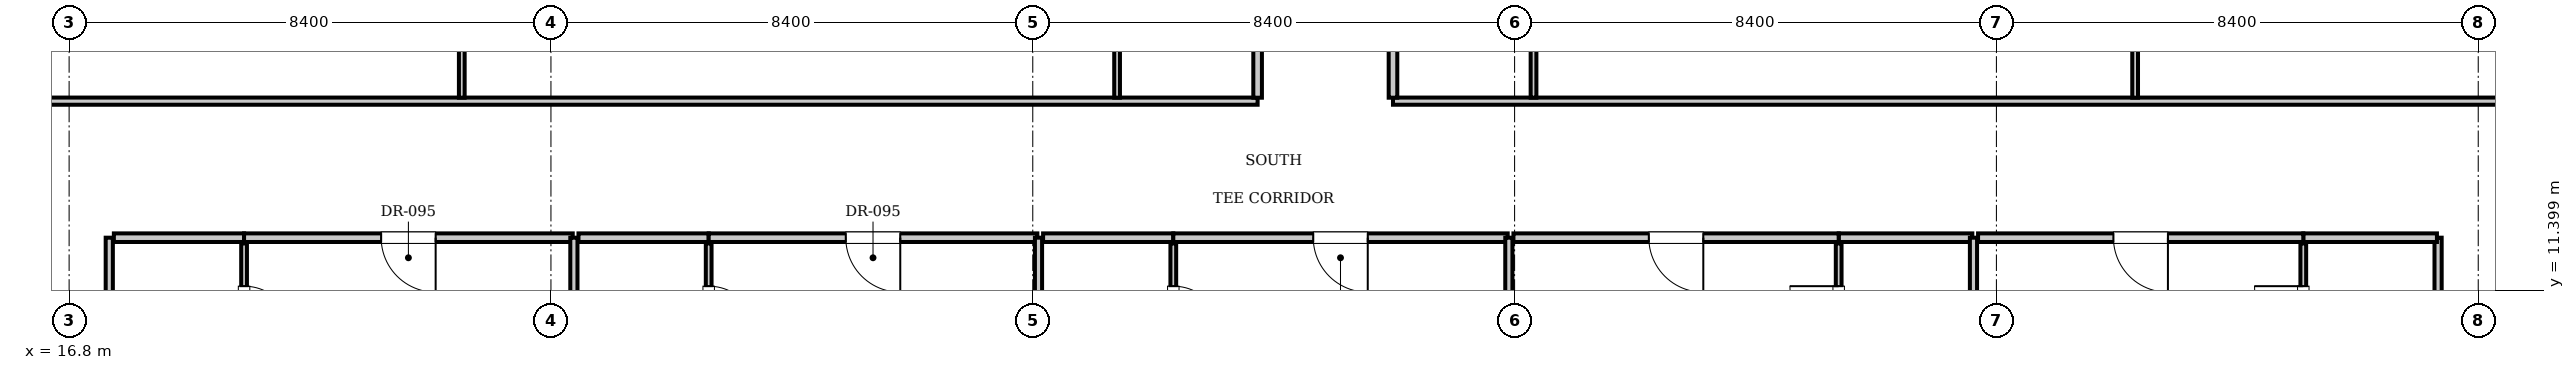
"""IFC4 building model, lengths in metres.
Left out: names, types, materials, properties, quantities, classifications, styles, units other than length and angle.
Written with IfcOpenShell. Run it as: python <this file> out.ifc"""

import sys

from ifc_helpers import new_model, si_unit, direction, frame, frame_2d, origin, place, context, subcontext, project, spatial, rectangle, extrude, element, fill, save


model = new_model("IFC4")
c1 = context("Model", 3, precision=1e-05, world=origin(), true_north=direction((0.0, 1.0)))
c2 = subcontext(c1, "Body", "Model", "MODEL_VIEW")
j1 = project(units=[si_unit("LENGTHUNIT", "METRE"), si_unit("PLANEANGLEUNIT", "RADIAN")], contexts=[c1])
p1 = place(None, origin())
s1 = spatial("IfcSite", under=j1, at=p1, CompositionType="ELEMENT")
p2 = place(p1, origin())
s2 = spatial("IfcBuilding", under=s1, at=p2, CompositionType="ELEMENT")
p3 = place(p2, frame((0.0, 0.0, 173.6)))
s3 = spatial("IfcBuildingStorey", under=s2, at=p3, CompositionType="ELEMENT", Elevation=173.6)
for number, where, z_axis, x_axis in (
    (1, (17.5, 9.0, 0.0), (0.0, 0.0, 1.0), (0.0, 1.0, 0.0)),
    (2, (58.1, 9.0, 0.0), (0.0, 0.0, 1.0), (0.0, 1.0, 0.0)),
):
    element("IfcWall", number, at=place(p3, frame(where, z_axis=z_axis, x_axis=x_axis)), inside=s3, PredefinedType="PARTITIONING", context=c2, shape_type="SweptSolid", body=[
        extrude(rectangle(XDim=3.32, YDim=0.125, at=frame_2d((1.66, 0.0))), origin(), (0.0, 0.0, 1.0), 3.61),
    ])
p4 = place(p3, frame((17.58, 12.32, 0.0), z_axis=(0.0, 0.0, 1.0), x_axis=(1.0, 0.0, 0.0)))
e3 = element("IfcWall", 3, at=p4, inside=s3, PredefinedType="PARTITIONING", context=c2, shape_type="SweptSolid", body=[
    extrude(rectangle(XDim=2.27, YDim=0.15, at=frame_2d((1.135, 0.0))), origin(), (0.0, 0.0, 1.0), 3.61),
])
p5 = place(p3, frame((19.85, 9.88, 0.0), z_axis=(0.0, 0.0, 1.0), x_axis=(0.0, 1.0, 0.0)))
e4 = element("IfcWall", 4, at=p5, inside=s3, PredefinedType="PARTITIONING", context=c2, shape_type="SweptSolid", body=[
    extrude(rectangle(XDim=2.34, YDim=0.1, at=frame_2d((1.17, 0.0))), origin(), (0.0, 0.0, 1.0), 3.61),
])
p6 = place(p5, frame((0.745, 0.0, 0.0)))
e5 = element("IfcOpeningElement", 5, at=p6, cuts=e4, PredefinedType="OPENING", context=c2, shape_type="SweptSolid", body=[
    extrude(rectangle(XDim=0.85, YDim=2.1, at=frame_2d((0.425, 1.05))), frame((0.0, 0.06, 0.0), z_axis=(0.0, -1.0, 0.0), x_axis=(1.0, 0.0, 0.0)), (0.0, 0.0, 1.0), 0.12),
])
p7 = place(p3, frame((19.85, 12.32, 0.0), z_axis=(0.0, 0.0, 1.0), x_axis=(1.0, 0.0, 0.0)))
e6 = element("IfcWall", 6, at=p7, inside=s3, PredefinedType="PARTITIONING", context=c2, shape_type="SweptSolid", body=[
    extrude(rectangle(XDim=5.73, YDim=0.15, at=frame_2d((2.865, 0.0))), origin(), (0.0, 0.0, 1.0), 3.61),
])
p8 = place(p7, frame((2.39, 0.0, 0.0)))
e7 = element("IfcOpeningElement", 7, at=p8, cuts=e6, PredefinedType="OPENING", context=c2, shape_type="SweptSolid", body=[
    extrude(rectangle(XDim=0.95, YDim=2.15, at=frame_2d((0.475, 1.075))), frame((0.0, 0.085, 0.0), z_axis=(0.0, -1.0, 0.0), x_axis=(1.0, 0.0, 0.0)), (0.0, 0.0, 1.0), 0.17),
])
p9 = place(p3, frame((25.6, 4.7, 0.0), z_axis=(0.0, 0.0, 1.0), x_axis=(0.0, 1.0, 0.0)))
e8 = element("IfcWall", 8, at=p9, inside=s3, PredefinedType="PARTITIONING", context=c2, shape_type="SweptSolid", body=[
    extrude(rectangle(XDim=7.62, YDim=0.125, at=frame_2d((3.81, 0.0))), origin(), (0.0, 0.0, 1.0), 3.61),
])
p10 = place(p3, frame((25.68, 12.32, 0.0), z_axis=(0.0, 0.0, 1.0), x_axis=(1.0, 0.0, 0.0)))
e9 = element("IfcWall", 9, at=p10, inside=s3, PredefinedType="PARTITIONING", context=c2, shape_type="SweptSolid", body=[
    extrude(rectangle(XDim=2.27, YDim=0.15, at=frame_2d((1.135, 0.0))), origin(), (0.0, 0.0, 1.0), 3.61),
])
p11 = place(p3, frame((27.95, 9.88, 0.0), z_axis=(0.0, 0.0, 1.0), x_axis=(0.0, 1.0, 0.0)))
e10 = element("IfcWall", 10, at=p11, inside=s3, PredefinedType="PARTITIONING", context=c2, shape_type="SweptSolid", body=[
    extrude(rectangle(XDim=2.34, YDim=0.1, at=frame_2d((1.17, 0.0))), origin(), (0.0, 0.0, 1.0), 3.61),
])
p12 = place(p11, frame((0.745, 0.0, 0.0)))
e11 = element("IfcOpeningElement", 11, at=p12, cuts=e10, PredefinedType="OPENING", context=c2, shape_type="SweptSolid", body=[
    extrude(rectangle(XDim=0.85, YDim=2.1, at=frame_2d((0.425, 1.05))), frame((0.0, 0.06, 0.0), z_axis=(0.0, -1.0, 0.0), x_axis=(1.0, 0.0, 0.0)), (0.0, 0.0, 1.0), 0.12),
])
p13 = place(p3, frame((27.95, 12.32, 0.0), z_axis=(0.0, 0.0, 1.0), x_axis=(1.0, 0.0, 0.0)))
e12 = element("IfcWall", 12, at=p13, inside=s3, PredefinedType="PARTITIONING", context=c2, shape_type="SweptSolid", body=[
    extrude(rectangle(XDim=5.73, YDim=0.15, at=frame_2d((2.865, 0.0))), origin(), (0.0, 0.0, 1.0), 3.61),
])
p14 = place(p13, frame((2.39, 0.0, 0.0)))
e13 = element("IfcOpeningElement", 13, at=p14, cuts=e12, PredefinedType="OPENING", context=c2, shape_type="SweptSolid", body=[
    extrude(rectangle(XDim=0.95, YDim=2.15, at=frame_2d((0.475, 1.075))), frame((0.0, 0.085, 0.0), z_axis=(0.0, -1.0, 0.0), x_axis=(1.0, 0.0, 0.0)), (0.0, 0.0, 1.0), 0.17),
])
p15 = place(p3, frame((33.7, 4.7, 0.0), z_axis=(0.0, 0.0, 1.0), x_axis=(0.0, 1.0, 0.0)))
e14 = element("IfcWall", 14, at=p15, inside=s3, PredefinedType="PARTITIONING", context=c2, shape_type="SweptSolid", body=[
    extrude(rectangle(XDim=7.62, YDim=0.125, at=frame_2d((3.81, 0.0))), origin(), (0.0, 0.0, 1.0), 3.007),
])
p16 = place(p3, frame((33.78, 12.32, 0.0), z_axis=(0.0, 0.0, 1.0), x_axis=(1.0, 0.0, 0.0)))
e15 = element("IfcWall", 15, at=p16, inside=s3, PredefinedType="PARTITIONING", context=c2, shape_type="SweptSolid", body=[
    extrude(rectangle(XDim=2.27, YDim=0.15, at=frame_2d((1.135, 0.0))), origin(), (0.0, 0.0, 1.0), 3.61),
])
p17 = place(p3, frame((36.05, 9.88, 0.0), z_axis=(0.0, 0.0, 1.0), x_axis=(0.0, 1.0, 0.0)))
e16 = element("IfcWall", 16, at=p17, inside=s3, PredefinedType="PARTITIONING", context=c2, shape_type="SweptSolid", body=[
    extrude(rectangle(XDim=2.34, YDim=0.1, at=frame_2d((1.17, 0.0))), origin(), (0.0, 0.0, 1.0), 3.61),
])
p18 = place(p17, frame((0.745, 0.0, 0.0)))
e17 = element("IfcOpeningElement", 17, at=p18, cuts=e16, PredefinedType="OPENING", context=c2, shape_type="SweptSolid", body=[
    extrude(rectangle(XDim=0.85, YDim=2.1, at=frame_2d((0.425, 1.05))), frame((0.0, 0.06, 0.0), z_axis=(0.0, -1.0, 0.0), x_axis=(1.0, 0.0, 0.0)), (0.0, 0.0, 1.0), 0.12),
])
p19 = place(p3, frame((36.05, 12.32, 0.0), z_axis=(0.0, 0.0, 1.0), x_axis=(1.0, 0.0, 0.0)))
e18 = element("IfcWall", 18, at=p19, inside=s3, PredefinedType="PARTITIONING", context=c2, shape_type="SweptSolid", body=[
    extrude(rectangle(XDim=5.83, YDim=0.15, at=frame_2d((2.915, 0.0))), origin(), (0.0, 0.0, 1.0), 3.61),
])
p20 = place(p19, frame((2.44, 0.0, 0.0)))
e19 = element("IfcOpeningElement", 19, at=p20, cuts=e18, PredefinedType="OPENING", context=c2, shape_type="SweptSolid", body=[
    extrude(rectangle(XDim=0.95, YDim=2.15, at=frame_2d((0.475, 1.075))), frame((0.0, 0.085, 0.0), z_axis=(0.0, -1.0, 0.0), x_axis=(1.0, 0.0, 0.0)), (0.0, 0.0, 1.0), 0.17),
])
p21 = place(p3, frame((41.9, 4.7, 0.0), z_axis=(0.0, 0.0, 1.0), x_axis=(0.0, 1.0, 0.0)))
e20 = element("IfcWall", 20, at=p21, inside=s3, PredefinedType="PARTITIONING", context=c2, shape_type="SweptSolid", body=[
    extrude(rectangle(XDim=7.62, YDim=0.125, at=frame_2d((3.81, 0.0))), origin(), (0.0, 0.0, 1.0), 3.007),
])
p22 = place(p3, frame((47.65, 12.32, 0.0), z_axis=(0.0, 0.0, 1.0), x_axis=(1.0, 0.0, 0.0)))
e21 = element("IfcWall", 21, at=p22, inside=s3, PredefinedType="PARTITIONING", context=c2, shape_type="SweptSolid", body=[
    extrude(rectangle(XDim=2.33, YDim=0.15, at=frame_2d((1.165, 0.0))), origin(), (0.0, 0.0, 1.0), 3.61),
])
p23 = place(p3, frame((47.65, 9.88, 0.0), z_axis=(0.0, 0.0, 1.0), x_axis=(0.0, 1.0, 0.0)))
e22 = element("IfcWall", 22, at=p23, inside=s3, PredefinedType="PARTITIONING", context=c2, shape_type="SweptSolid", body=[
    extrude(rectangle(XDim=2.34, YDim=0.1, at=frame_2d((1.17, 0.0))), origin(), (0.0, 0.0, 1.0), 3.61),
])
p24 = place(p23, frame((0.745, 0.0, 0.0)))
e23 = element("IfcOpeningElement", 23, at=p24, cuts=e22, PredefinedType="OPENING", context=c2, shape_type="SweptSolid", body=[
    extrude(rectangle(XDim=0.85, YDim=2.1, at=frame_2d((0.425, 1.05))), frame((0.0, 0.06, 0.0), z_axis=(0.0, -1.0, 0.0), x_axis=(1.0, 0.0, 0.0)), (0.0, 0.0, 1.0), 0.12),
])
p25 = place(p3, frame((41.98, 12.32, 0.0), z_axis=(0.0, 0.0, 1.0), x_axis=(1.0, 0.0, 0.0)))
e24 = element("IfcWall", 24, at=p25, inside=s3, PredefinedType="PARTITIONING", context=c2, shape_type="SweptSolid", body=[
    extrude(rectangle(XDim=5.67, YDim=0.15, at=frame_2d((2.835, 0.0))), origin(), (0.0, 0.0, 1.0), 3.61),
])
p26 = place(p25, frame((2.36, 0.0, 0.0)))
e25 = element("IfcOpeningElement", 25, at=p26, cuts=e24, PredefinedType="OPENING", context=c2, shape_type="SweptSolid", body=[
    extrude(rectangle(XDim=0.95, YDim=2.15, at=frame_2d((0.475, 1.075))), frame((0.0, 0.085, 0.0), z_axis=(0.0, -1.0, 0.0), x_axis=(1.0, 0.0, 0.0)), (0.0, 0.0, 1.0), 0.17),
])
p27 = place(p3, frame((50.0, 4.7, 0.0), z_axis=(0.0, 0.0, 1.0), x_axis=(0.0, 1.0, 0.0)))
e26 = element("IfcWall", 26, at=p27, inside=s3, PredefinedType="PARTITIONING", context=c2, shape_type="SweptSolid", body=[
    extrude(rectangle(XDim=7.62, YDim=0.125, at=frame_2d((3.81, 0.0))), origin(), (0.0, 0.0, 1.0), 3.61),
])
p28 = place(p3, frame((55.75, 12.32, 0.0), z_axis=(0.0, 0.0, 1.0), x_axis=(1.0, 0.0, 0.0)))
e27 = element("IfcWall", 27, at=p28, inside=s3, PredefinedType="PARTITIONING", context=c2, shape_type="SweptSolid", body=[
    extrude(rectangle(XDim=2.33, YDim=0.15, at=frame_2d((1.165, 0.0))), origin(), (0.0, 0.0, 1.0), 3.61),
])
p29 = place(p3, frame((55.75, 9.88, 0.0), z_axis=(0.0, 0.0, 1.0), x_axis=(0.0, 1.0, 0.0)))
e28 = element("IfcWall", 28, at=p29, inside=s3, PredefinedType="PARTITIONING", context=c2, shape_type="SweptSolid", body=[
    extrude(rectangle(XDim=2.34, YDim=0.1, at=frame_2d((1.17, 0.0))), origin(), (0.0, 0.0, 1.0), 3.61),
])
p30 = place(p29, frame((0.745, 0.0, 0.0)))
e29 = element("IfcOpeningElement", 29, at=p30, cuts=e28, PredefinedType="OPENING", context=c2, shape_type="SweptSolid", body=[
    extrude(rectangle(XDim=0.85, YDim=2.1, at=frame_2d((0.425, 1.05))), frame((0.0, 0.06, 0.0), z_axis=(0.0, -1.0, 0.0), x_axis=(1.0, 0.0, 0.0)), (0.0, 0.0, 1.0), 0.12),
])
p31 = place(p3, frame((50.08, 12.32, 0.0), z_axis=(0.0, 0.0, 1.0), x_axis=(1.0, 0.0, 0.0)))
e30 = element("IfcWall", 30, at=p31, inside=s3, PredefinedType="PARTITIONING", context=c2, shape_type="SweptSolid", body=[
    extrude(rectangle(XDim=5.67, YDim=0.15, at=frame_2d((2.835, 0.0))), origin(), (0.0, 0.0, 1.0), 3.61),
])
p32 = place(p31, frame((2.36, 0.0, 0.0)))
e31 = element("IfcOpeningElement", 31, at=p32, cuts=e30, PredefinedType="OPENING", context=c2, shape_type="SweptSolid", body=[
    extrude(rectangle(XDim=0.95, YDim=2.15, at=frame_2d((0.475, 1.075))), frame((0.0, 0.085, 0.0), z_axis=(0.0, -1.0, 0.0), x_axis=(1.0, 0.0, 0.0)), (0.0, 0.0, 1.0), 0.17),
])
p33 = place(p3, frame((13.2, 14.7, 0.0), z_axis=(0.0, 0.0, 1.0), x_axis=(1.0, 0.0, 0.0)))
e32 = element("IfcWall", 32, at=p33, inside=s3, PredefinedType="PARTITIONING", context=c2, shape_type="SweptSolid", body=[
    extrude(rectangle(XDim=24.32, YDim=0.125, at=frame_2d((12.16, 0.0))), origin(), (0.0, 0.0, 1.0), 3.61),
])
p34 = place(p3, frame((39.88, 14.7, 0.0), z_axis=(0.0, 0.0, 1.0), x_axis=(1.0, 0.0, 0.0)))
e33 = element("IfcWall", 33, at=p34, inside=s3, PredefinedType="PARTITIONING", context=c2, shape_type="SweptSolid", body=[
    extrude(rectangle(XDim=22.52, YDim=0.125, at=frame_2d((11.26, 0.0))), origin(), (0.0, 0.0, 1.0), 3.61),
])
p35 = place(p3, frame((37.52, 14.76, 0.0), z_axis=(0.0, 0.0, 1.0), x_axis=(0.0, 1.0, 0.0)))
e34 = element("IfcWall", 34, at=p35, inside=s3, PredefinedType="PARTITIONING", context=c2, shape_type="SweptSolid", body=[
    extrude(rectangle(XDim=1.89, YDim=0.15, at=frame_2d((0.945, 0.0))), origin(), (0.0, 0.0, 1.0), 3.61),
])
p36 = place(p3, frame((35.07, 14.76, 0.0), z_axis=(0.0, 0.0, 1.0), x_axis=(0.0, 1.0, 0.0)))
e35 = element("IfcWall", 35, at=p36, inside=s3, PredefinedType="PARTITIONING", context=c2, shape_type="SweptSolid", body=[
    extrude(rectangle(XDim=1.89, YDim=0.1, at=frame_2d((0.945, 0.0))), origin(), (0.0, 0.0, 1.0), 3.61),
])
p37 = place(p3, frame((23.646, 14.76, 0.0), z_axis=(0.0, 0.0, 1.0), x_axis=(0.0, 1.0, 0.0)))
e36 = element("IfcWall", 36, at=p37, inside=s3, PredefinedType="PARTITIONING", context=c2, shape_type="SweptSolid", body=[
    extrude(rectangle(XDim=3.98, YDim=0.1, at=frame_2d((1.99, 0.0))), origin(), (0.0, 0.0, 1.0), 3.61),
])
p38 = place(p37, frame((1.54, 0.0, 0.0)))
e37 = element("IfcOpeningElement", 37, at=p38, cuts=e36, PredefinedType="OPENING", context=c2, shape_type="SweptSolid", body=[
    extrude(rectangle(XDim=0.9, YDim=2.1, at=frame_2d((0.45, 1.05))), frame((0.0, 0.06, 0.0), z_axis=(0.0, -1.0, 0.0), x_axis=(1.0, 0.0, 0.0)), (0.0, 0.0, 1.0), 0.12),
])
p39 = place(p3, frame((39.88, 14.76, 0.0), z_axis=(0.0, 0.0, 1.0), x_axis=(0.0, 1.0, 0.0)))
e38 = element("IfcWall", 38, at=p39, inside=s3, PredefinedType="PARTITIONING", context=c2, shape_type="SweptSolid", body=[
    extrude(rectangle(XDim=1.89, YDim=0.15, at=frame_2d((0.945, 0.0))), origin(), (0.0, 0.0, 1.0), 3.61),
])
p40 = place(p3, frame((42.33, 14.76, 0.0), z_axis=(0.0, 0.0, 1.0), x_axis=(0.0, 1.0, 0.0)))
e39 = element("IfcWall", 39, at=p40, inside=s3, PredefinedType="PARTITIONING", context=c2, shape_type="SweptSolid", body=[
    extrude(rectangle(XDim=1.89, YDim=0.1, at=frame_2d((0.945, 0.0))), origin(), (0.0, 0.0, 1.0), 3.61),
])
p41 = place(p3, frame((52.818, 14.76, 0.0), z_axis=(0.0, 0.0, 1.0), x_axis=(0.0, 1.0, 0.0)))
e40 = element("IfcWall", 40, at=p41, inside=s3, PredefinedType="PARTITIONING", context=c2, shape_type="SweptSolid", body=[
    extrude(rectangle(XDim=3.98, YDim=0.1, at=frame_2d((1.99, 0.0))), origin(), (0.0, 0.0, 1.0), 3.61),
])
p42 = place(p41, frame((1.54, 0.0, 0.0)))
e41 = element("IfcOpeningElement", 41, at=p42, cuts=e40, PredefinedType="OPENING", context=c2, shape_type="SweptSolid", body=[
    extrude(rectangle(XDim=0.9, YDim=2.1, at=frame_2d((0.45, 1.05))), frame((0.0, 0.06, 0.0), z_axis=(0.0, -1.0, 0.0), x_axis=(1.0, 0.0, 0.0)), (0.0, 0.0, 1.0), 0.12),
])
p43 = place(p6, frame((0.85, 0.0, 0.0), z_axis=(0.0, 0.0, 1.0), x_axis=(-1.0, 0.0, 0.0)))
e42 = element("IfcDoor", 42, at=p43, inside=s3, OperationType="SINGLE_SWING_RIGHT", PredefinedType="DOOR", context=c2, shape_type="SweptSolid", body=[
    extrude(rectangle(XDim=0.85, YDim=2.1, at=frame_2d((0.425, 1.05))), frame((0.0, 0.025, 0.0), z_axis=(0.0, -1.0, 0.0), x_axis=(1.0, 0.0, 0.0)), (0.0, 0.0, 1.0), 0.05),
])
fill(e5, e42)
p44 = place(p8, frame((0.95, 0.0, 0.0), z_axis=(0.0, 0.0, 1.0), x_axis=(-1.0, 0.0, 0.0)))
e43 = element("IfcDoor", 43, at=p44, inside=s3, OperationType="SINGLE_SWING_LEFT", PredefinedType="DOOR", context=c2, shape_type="SweptSolid", body=[
    extrude(rectangle(XDim=0.95, YDim=2.15, at=frame_2d((0.475, 1.075))), frame((0.0, 0.025, 0.0), z_axis=(0.0, -1.0, 0.0), x_axis=(1.0, 0.0, 0.0)), (0.0, 0.0, 1.0), 0.05),
])
fill(e7, e43)
p45 = place(p12, frame((0.85, 0.0, 0.0), z_axis=(0.0, 0.0, 1.0), x_axis=(-1.0, 0.0, 0.0)))
e44 = element("IfcDoor", 44, at=p45, inside=s3, OperationType="SINGLE_SWING_RIGHT", PredefinedType="DOOR", context=c2, shape_type="SweptSolid", body=[
    extrude(rectangle(XDim=0.85, YDim=2.1, at=frame_2d((0.425, 1.05))), frame((0.0, 0.025, 0.0), z_axis=(0.0, -1.0, 0.0), x_axis=(1.0, 0.0, 0.0)), (0.0, 0.0, 1.0), 0.05),
])
fill(e11, e44)
p46 = place(p14, frame((0.95, 0.0, 0.0), z_axis=(0.0, 0.0, 1.0), x_axis=(-1.0, 0.0, 0.0)))
e45 = element("IfcDoor", 45, at=p46, inside=s3, OperationType="SINGLE_SWING_LEFT", PredefinedType="DOOR", context=c2, shape_type="SweptSolid", body=[
    extrude(rectangle(XDim=0.95, YDim=2.15, at=frame_2d((0.475, 1.075))), frame((0.0, 0.025, 0.0), z_axis=(0.0, -1.0, 0.0), x_axis=(1.0, 0.0, 0.0)), (0.0, 0.0, 1.0), 0.05),
])
fill(e13, e45)
p47 = place(p18, frame((0.85, 0.0, 0.0), z_axis=(0.0, 0.0, 1.0), x_axis=(-1.0, 0.0, 0.0)))
e46 = element("IfcDoor", 46, at=p47, inside=s3, OperationType="SINGLE_SWING_RIGHT", PredefinedType="DOOR", context=c2, shape_type="SweptSolid", body=[
    extrude(rectangle(XDim=0.85, YDim=2.1, at=frame_2d((0.425, 1.05))), frame((0.0, 0.025, 0.0), z_axis=(0.0, -1.0, 0.0), x_axis=(1.0, 0.0, 0.0)), (0.0, 0.0, 1.0), 0.05),
])
fill(e17, e46)
p48 = place(p20, frame((0.95, 0.0, 0.0), z_axis=(0.0, 0.0, 1.0), x_axis=(-1.0, 0.0, 0.0)))
e47 = element("IfcDoor", 47, at=p48, inside=s3, OperationType="SINGLE_SWING_LEFT", PredefinedType="DOOR", context=c2, shape_type="SweptSolid", body=[
    extrude(rectangle(XDim=0.95, YDim=2.15, at=frame_2d((0.475, 1.075))), frame((0.0, 0.025, 0.0), z_axis=(0.0, -1.0, 0.0), x_axis=(1.0, 0.0, 0.0)), (0.0, 0.0, 1.0), 0.05),
])
fill(e19, e47)
p49 = place(p24, origin())
e48 = element("IfcDoor", 48, at=p49, inside=s3, OperationType="SINGLE_SWING_RIGHT", PredefinedType="DOOR", context=c2, shape_type="SweptSolid", body=[
    extrude(rectangle(XDim=0.85, YDim=2.1, at=frame_2d((0.425, 1.05))), frame((0.0, 0.025, 0.0), z_axis=(0.0, -1.0, 0.0), x_axis=(1.0, 0.0, 0.0)), (0.0, 0.0, 1.0), 0.05),
])
fill(e23, e48)
p50 = place(p26, frame((0.95, 0.0, 0.0), z_axis=(0.0, 0.0, 1.0), x_axis=(-1.0, 0.0, 0.0)))
e49 = element("IfcDoor", 49, at=p50, inside=s3, OperationType="SINGLE_SWING_LEFT", PredefinedType="DOOR", context=c2, shape_type="SweptSolid", body=[
    extrude(rectangle(XDim=0.95, YDim=2.15, at=frame_2d((0.475, 1.075))), frame((0.0, 0.025, 0.0), z_axis=(0.0, -1.0, 0.0), x_axis=(1.0, 0.0, 0.0)), (0.0, 0.0, 1.0), 0.05),
])
fill(e25, e49)
p51 = place(p30, origin())
e50 = element("IfcDoor", 50, at=p51, inside=s3, OperationType="SINGLE_SWING_RIGHT", PredefinedType="DOOR", context=c2, shape_type="SweptSolid", body=[
    extrude(rectangle(XDim=0.85, YDim=2.1, at=frame_2d((0.425, 1.05))), frame((0.0, 0.025, 0.0), z_axis=(0.0, -1.0, 0.0), x_axis=(1.0, 0.0, 0.0)), (0.0, 0.0, 1.0), 0.05),
])
fill(e29, e50)
p52 = place(p32, frame((0.95, 0.0, 0.0), z_axis=(0.0, 0.0, 1.0), x_axis=(-1.0, 0.0, 0.0)))
e51 = element("IfcDoor", 51, at=p52, inside=s3, OperationType="SINGLE_SWING_LEFT", PredefinedType="DOOR", context=c2, shape_type="SweptSolid", body=[
    extrude(rectangle(XDim=0.95, YDim=2.15, at=frame_2d((0.475, 1.075))), frame((0.0, 0.025, 0.0), z_axis=(0.0, -1.0, 0.0), x_axis=(1.0, 0.0, 0.0)), (0.0, 0.0, 1.0), 0.05),
])
fill(e31, e51)
save(model, sys.argv[1])
